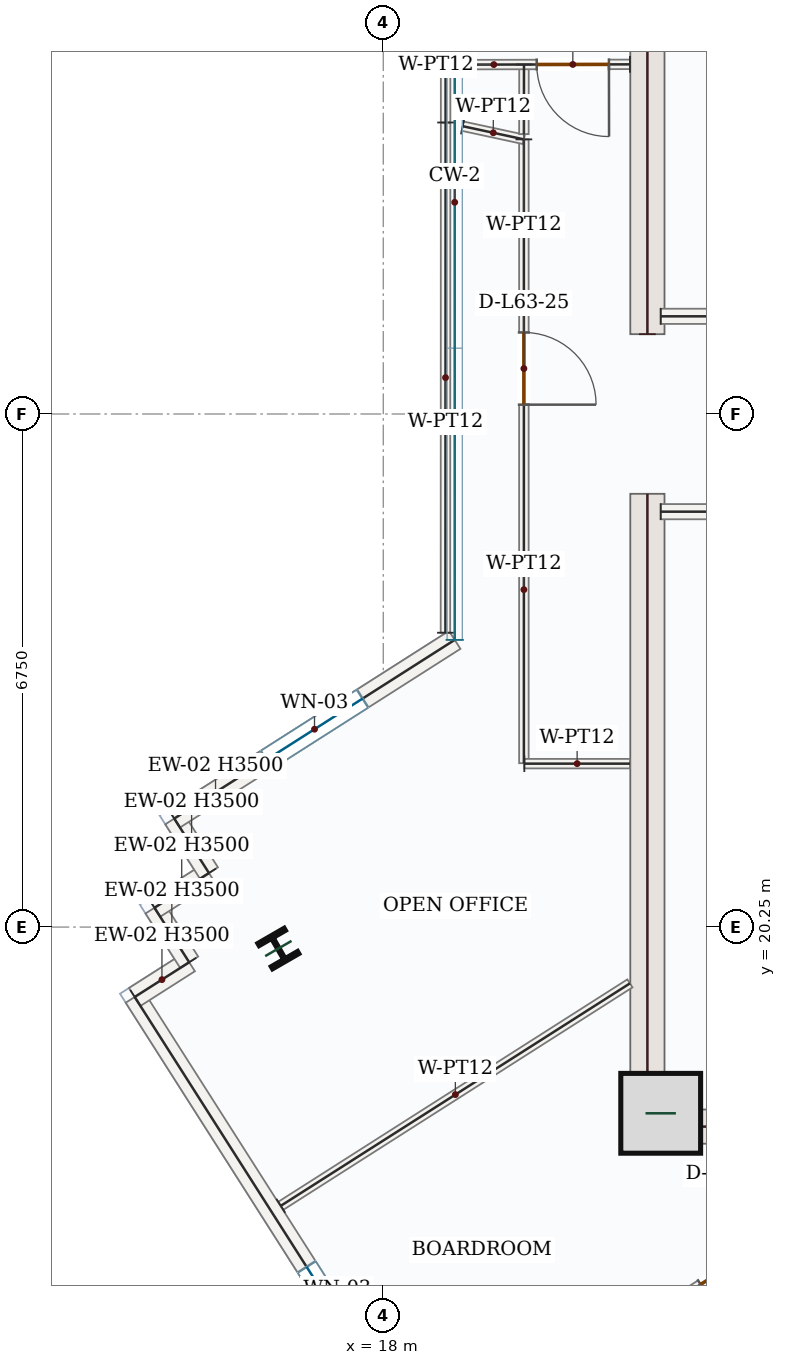
"""IFC4 building model, lengths in metres.
Left out: names, types, materials, properties, quantities, classifications, styles, units other than length and angle.
Written with IfcOpenShell. Run it as: python <this file> out.ifc"""

import sys

from ifc_helpers import new_model, si_unit, direction, frame, frame_2d, origin, origin_2d, place, context, subcontext, project, spatial, rectangle, i_section, extrude, source, transform, mapped, element, fill, save


model = new_model("IFC4")
c1 = context("Model", 3, precision=1e-05, world=origin(), true_north=direction((0.0, 1.0)))
c2 = subcontext(c1, "Body", "Model", "MODEL_VIEW")
j1 = project(units=[si_unit("LENGTHUNIT", "METRE"), si_unit("PLANEANGLEUNIT", "RADIAN")], contexts=[c1])
p1 = place(None, origin())
s1 = spatial("IfcSite", under=j1, at=p1, CompositionType="ELEMENT")
p2 = place(p1, origin())
s2 = spatial("IfcBuilding", under=s1, at=p2, CompositionType="ELEMENT")
p3 = place(p2, frame((0.0, 0.0, 265.35)))
s3 = spatial("IfcBuildingStorey", under=s2, at=p3, CompositionType="ELEMENT", Elevation=265.35)
m1 = source(origin(), c2, "Body", "SweptSolid", [
    extrude(rectangle(XDim=8.55, YDim=0.45, at=frame_2d((4.275, 0.0))), origin(), (0.0, 0.0, 1.0), 3.5),
])
for number, where, z_axis, x_axis in (
    (1, (21.475, 17.4, 0.0), (0.0, 0.0, 1.0), (0.0, 1.0, 0.0)),
    (2, (21.475, 28.05, 0.0), (0.0, 0.0, 1.0), (0.0, 1.0, 0.0)),
):
    element("IfcWall", number, at=place(p3, frame(where, z_axis=z_axis, x_axis=x_axis)), inside=s3, PredefinedType="SHEAR", context=c2, shape_type="MappedRepresentation", body=[
        mapped(m1, transform((0.0, 0.0, 0.0), x_axis=(1.0, 0.0, 0.0), y_axis=(0.0, 1.0, 0.0), z_axis=(0.0, 0.0, 1.0), scale=1.0)),
    ])
m2 = source(origin(), c2, "Body", "SweptSolid", [
    extrude(rectangle(XDim=7.1, YDim=0.45, at=frame_2d((3.55, 0.0))), origin(), (0.0, 0.0, 1.0), 3.5),
])
p4 = place(p3, frame((21.7, 17.625, 0.0), z_axis=(0.0, 0.0, 1.0), x_axis=(1.0, 0.0, 0.0)))
e3 = element("IfcWall", 3, at=p4, inside=s3, PredefinedType="SHEAR", context=c2, shape_type="MappedRepresentation", body=[
    mapped(m2, transform((0.0, 0.0, 0.0), x_axis=(1.0, 0.0, 0.0), y_axis=(0.0, 1.0, 0.0), z_axis=(0.0, 0.0, 1.0), scale=1.0)),
])
m3 = source(origin(), c2, "Body", "SweptSolid", [
    extrude(rectangle(XDim=1.05, YDim=1.05, at=origin_2d()), origin(), (0.0, 0.0, 1.0), 3.75),
])
p5 = place(p3, frame((21.65, 17.8, 0.0), z_axis=(0.0, 0.0, 1.0), x_axis=(1.0, 0.0, 0.0)))
e4 = element("IfcColumn", 4, at=p5, inside=s3, PredefinedType="COLUMN", context=c2, shape_type="MappedRepresentation", body=[
    mapped(m3, transform((0.0, 0.0, 0.0), x_axis=(1.0, 0.0, 0.0), y_axis=(0.0, 1.0, 0.0), z_axis=(0.0, 0.0, 1.0), scale=1.0)),
])
m4 = source(origin(), c2, "Body", "SweptSolid", [
    extrude(i_section(OverallWidth=0.399, OverallDepth=0.386, WebThickness=0.021, FlangeThickness=0.033, FilletRadius=0.018, at=origin_2d()), origin(), (0.0, 0.0, 1.0), 3.75),
])
p6 = place(p3, frame((16.62, 19.968, 0.0), z_axis=(0.0, 0.0, 1.0), x_axis=(0.866025403784, 0.5, 0.0)))
e5 = element("IfcColumn", 5, at=p6, inside=s3, PredefinedType="COLUMN", context=c2, shape_type="MappedRepresentation", body=[
    mapped(m4, transform((0.0, 0.0, 0.0), x_axis=(1.0, 0.0, 0.0), y_axis=(0.0, 1.0, 0.0), z_axis=(0.0, 0.0, 1.0), scale=1.0)),
])
p7 = place(p3, frame((20.06, 10.964, 0.0), z_axis=(0.0, 0.0, 1.0), x_axis=(-0.537314949054, 0.843381672508, 0.0)))
e6 = element("IfcWall", 6, at=p7, inside=s3, PredefinedType="SOLIDWALL", context=c2, shape_type="SweptSolid", body=[
    extrude(rectangle(XDim=9.92, YDim=0.28, at=frame_2d((4.96, 0.0))), origin(), (0.0, 0.0, 1.0), 3.5),
])
p8 = place(p7, frame((4.21, 0.0, 0.85)))
e7 = element("IfcOpeningElement", 7, at=p8, cuts=e6, PredefinedType="OPENING", context=c2, shape_type="SweptSolid", body=[
    extrude(rectangle(XDim=1.5, YDim=1.5, at=frame_2d((0.75, 0.75))), frame((0.0, 0.15, 0.0), z_axis=(0.0, -1.0, 0.0), x_axis=(1.0, 0.0, 0.0)), (0.0, 0.0, 1.0), 0.3),
])
m5 = source(origin(), c2, "Body", "SweptSolid", [
    extrude(rectangle(XDim=0.85, YDim=0.28, at=frame_2d((0.425, 0.0))), origin(), (0.0, 0.0, 1.0), 3.5),
])
p9 = place(p3, frame((14.73, 19.33, 0.0), z_axis=(0.0, 0.0, 1.0), x_axis=(0.843401251716, 0.537284215853, 0.0)))
e8 = element("IfcWall", 8, at=p9, inside=s3, PredefinedType="SOLIDWALL", context=c2, shape_type="MappedRepresentation", body=[
    mapped(m5, transform((0.0, 0.0, 0.0), x_axis=(1.0, 0.0, 0.0), y_axis=(0.0, 1.0, 0.0), z_axis=(0.0, 0.0, 1.0), scale=1.0)),
])
m6 = source(origin(), c2, "Body", "SweptSolid", [
    extrude(rectangle(XDim=0.85, YDim=0.28, at=frame_2d((0.425, 0.0))), origin(), (0.0, 0.0, 1.0), 3.5),
])
for number, where, z_axis, x_axis in (
    (9, (15.447, 19.787, 0.0), (0.0, 0.0, 1.0), (-0.537, 0.843, 0.0)),
    (10, (14.99, 20.504, 0.0), (0.0, 0.0, 1.0), (0.843, 0.537, 0.0)),
    (11, (15.707, 20.961, 0.0), (0.0, 0.0, 1.0), (-0.537, 0.843, 0.0)),
):
    element("IfcWall", number, at=place(p3, frame(where, z_axis=z_axis, x_axis=x_axis)), inside=s3, PredefinedType="SOLIDWALL", context=c2, shape_type="MappedRepresentation", body=[
        mapped(m6, transform((0.0, 0.0, 0.0), x_axis=(1.0, 0.0, 0.0), y_axis=(0.0, 1.0, 0.0), z_axis=(0.0, 0.0, 1.0), scale=1.0)),
    ])
p10 = place(p3, frame((15.25, 21.677, 0.0), z_axis=(0.0, 0.0, 1.0), x_axis=(0.843383352012, 0.537312312857, 0.0)))
e12 = element("IfcWall", 12, at=p10, inside=s3, PredefinedType="SOLIDWALL", context=c2, shape_type="SweptSolid", body=[
    extrude(rectangle(XDim=4.375, YDim=0.28, at=frame_2d((2.188, 0.0))), origin(), (0.0, 0.0, 1.0), 3.5),
])
p11 = place(p10, frame((1.438, 0.0, 0.85)))
e13 = element("IfcOpeningElement", 13, at=p11, cuts=e12, PredefinedType="OPENING", context=c2, shape_type="SweptSolid", body=[
    extrude(rectangle(XDim=1.5, YDim=1.5, at=frame_2d((0.75, 0.75))), frame((0.0, 0.15, 0.0), z_axis=(0.0, -1.0, 0.0), x_axis=(1.0, 0.0, 0.0)), (0.0, 0.0, 1.0), 0.3),
])
m7 = source(origin(), c2, "Body", "SweptSolid", [
    extrude(rectangle(XDim=4.25, YDim=0.2, at=frame_2d((2.125, 0.0))), origin(), (0.0, 0.0, 1.0), 3.5),
])
for number, where, z_axis, x_axis in (
    (14, (21.65, 25.715, 0.0), (0.0, 0.0, 1.0), (1.0, 0.0, 0.0)),
    (15, (21.65, 28.285, 0.0), (0.0, 0.0, 1.0), (1.0, 0.0, 0.0)),
):
    element("IfcWall", number, at=place(p3, frame(where, z_axis=z_axis, x_axis=x_axis)), inside=s3, PredefinedType="SOLIDWALL", context=c2, shape_type="MappedRepresentation", body=[
        mapped(m7, transform((0.0, 0.0, 0.0), x_axis=(1.0, 0.0, 0.0), y_axis=(0.0, 1.0, 0.0), z_axis=(0.0, 0.0, 1.0), scale=1.0)),
    ])
p12 = place(p3, frame((25.073, 17.395, 0.0), z_axis=(0.0, 0.0, 1.0), x_axis=(-0.843398332862, -0.537288797693, 0.0)))
e16 = element("IfcWall", 16, at=p12, inside=s3, PredefinedType="PARTITIONING", context=c2, shape_type="SweptSolid", body=[
    extrude(rectangle(XDim=5.924, YDim=0.125, at=frame_2d((2.962, 0.0))), origin(), (0.0, 0.0, 1.0), 3.5),
])
p13 = place(p12, frame((2.487, 0.0, 0.0)))
e17 = element("IfcOpeningElement", 17, at=p13, cuts=e16, PredefinedType="OPENING", context=c2, shape_type="SweptSolid", body=[
    extrude(rectangle(XDim=0.95, YDim=2.15, at=frame_2d((0.475, 1.075))), frame((0.0, 0.073, 0.0), z_axis=(0.0, -1.0, 0.0), x_axis=(1.0, 0.0, 0.0)), (0.0, 0.0, 1.0), 0.145),
])
m8 = source(origin(), c2, "Body", "SweptSolid", [
    extrude(rectangle(XDim=5.446, YDim=0.125, at=frame_2d((2.723, 0.0))), origin(), (0.0, 0.0, 1.0), 3.5),
])
p14 = place(p3, frame((16.652, 16.583, 0.0), z_axis=(0.0, 0.0, 1.0), x_axis=(0.843395566027, 0.537293140851, 0.0)))
e18 = element("IfcWall", 18, at=p14, inside=s3, PredefinedType="PARTITIONING", context=c2, shape_type="MappedRepresentation", body=[
    mapped(m8, transform((0.0, 0.0, 0.0), x_axis=(1.0, 0.0, 0.0), y_axis=(0.0, 1.0, 0.0), z_axis=(0.0, 0.0, 1.0), scale=1.0)),
])
p15 = place(p3, frame((19.85, 30.613, 0.0), z_axis=(0.0, 0.0, 1.0), x_axis=(0.0, -1.0, 0.0)))
e19 = element("IfcWall", 19, at=p15, inside=s3, PredefinedType="PARTITIONING", context=c2, shape_type="SweptSolid", body=[
    extrude(rectangle(XDim=8.207, YDim=0.125, at=frame_2d((4.104, 0.0))), origin(), (0.0, 0.0, 1.0), 3.5),
])
p16 = place(p15, frame((2.54, 0.0, 0.0)))
e20 = element("IfcOpeningElement", 20, at=p16, cuts=e19, PredefinedType="OPENING", context=c2, shape_type="SweptSolid", body=[
    extrude(rectangle(XDim=0.95, YDim=2.15, at=frame_2d((0.475, 1.075))), frame((0.0, 0.073, 0.0), z_axis=(0.0, -1.0, 0.0), x_axis=(1.0, 0.0, 0.0)), (0.0, 0.0, 1.0), 0.145),
])
m9 = source(origin(), c2, "Body", "SweptSolid", [
    extrude(rectangle(XDim=1.389, YDim=0.125, at=frame_2d((0.695, 0.0))), origin(), (0.0, 0.0, 1.0), 3.5),
])
p17 = place(p3, frame((19.856, 22.4, 0.0), z_axis=(0.0, 0.0, 1.0), x_axis=(1.0, 0.0, 0.0)))
e21 = element("IfcWall", 21, at=p17, inside=s3, PredefinedType="PARTITIONING", context=c2, shape_type="MappedRepresentation", body=[
    mapped(m9, transform((0.0, 0.0, 0.0), x_axis=(1.0, 0.0, 0.0), y_axis=(0.0, 1.0, 0.0), z_axis=(0.0, 0.0, 1.0), scale=1.0)),
])
m10 = source(origin(), c2, "Body", "SweptSolid", [
    extrude(rectangle(XDim=6.713, YDim=0.125, at=frame_2d((3.356, 0.0))), origin(), (0.0, 0.0, 1.0), 3.5),
])
p18 = place(p3, frame((18.818, 24.122, 0.0), z_axis=(0.0, 0.0, 1.0), x_axis=(0.000327332225, 0.999999946427, 0.0)))
e22 = element("IfcWall", 22, at=p18, inside=s3, PredefinedType="PARTITIONING", context=c2, shape_type="MappedRepresentation", body=[
    mapped(m10, transform((0.0, 0.0, 0.0), x_axis=(1.0, 0.0, 0.0), y_axis=(0.0, 1.0, 0.0), z_axis=(0.0, 0.0, 1.0), scale=1.0)),
])
m11 = source(origin(), c2, "Body", "SweptSolid", [
    extrude(rectangle(XDim=0.824, YDim=0.125, at=frame_2d((0.412, 0.0))), origin(), (0.0, 0.0, 1.0), 3.5),
])
p19 = place(p3, frame((19.045, 30.786, 0.0), z_axis=(0.0, 0.0, 1.0), x_axis=(0.977541402347, -0.210743461816, 0.0)))
e23 = element("IfcWall", 23, at=p19, inside=s3, PredefinedType="PARTITIONING", context=c2, shape_type="MappedRepresentation", body=[
    mapped(m11, transform((0.0, 0.0, 0.0), x_axis=(1.0, 0.0, 0.0), y_axis=(0.0, 1.0, 0.0), z_axis=(0.0, 0.0, 1.0), scale=1.0)),
])
m12 = source(origin(), c2, "Body", "SweptSolid", [
    extrude(rectangle(XDim=0.916, YDim=0.125, at=frame_2d((0.458, 0.0))), origin(), (0.0, 0.0, 1.0), 3.5),
])
p20 = place(p3, frame((19.851, 31.598, 0.0), z_axis=(0.0, 0.0, 1.0), x_axis=(-0.001332976688, -0.999999111586, 0.0)))
e24 = element("IfcWall", 24, at=p20, inside=s3, PredefinedType="PARTITIONING", context=c2, shape_type="MappedRepresentation", body=[
    mapped(m12, transform((0.0, 0.0, 0.0), x_axis=(1.0, 0.0, 0.0), y_axis=(0.0, 1.0, 0.0), z_axis=(0.0, 0.0, 1.0), scale=1.0)),
])
m13 = source(origin(), c2, "Body", "SweptSolid", [
    extrude(rectangle(XDim=4.757, YDim=0.125, at=frame_2d((2.378, 0.0))), origin(), (0.0, 0.0, 1.0), 3.5),
])
p21 = place(p3, frame((18.82, 30.835, 0.0), z_axis=(0.0, 0.0, 1.0), x_axis=(0.0, 1.0, 0.0)))
e25 = element("IfcWall", 25, at=p21, inside=s3, PredefinedType="PARTITIONING", context=c2, shape_type="MappedRepresentation", body=[
    mapped(m13, transform((0.0, 0.0, 0.0), x_axis=(1.0, 0.0, 0.0), y_axis=(0.0, 1.0, 0.0), z_axis=(0.0, 0.0, 1.0), scale=1.0)),
])
p22 = place(p3, frame((21.245, 31.6, 0.0), z_axis=(0.0, 0.0, 1.0), x_axis=(-0.999998798684, -0.001550042425, 0.0)))
e26 = element("IfcWall", 26, at=p22, inside=s3, PredefinedType="PARTITIONING", context=c2, shape_type="SweptSolid", body=[
    extrude(rectangle(XDim=2.205, YDim=0.125, at=frame_2d((1.103, 0.0))), origin(), (0.0, 0.0, 1.0), 3.5),
])
p23 = place(p22, frame((0.276, 0.0, 0.0)))
e27 = element("IfcOpeningElement", 27, at=p23, cuts=e26, PredefinedType="OPENING", context=c2, shape_type="SweptSolid", body=[
    extrude(rectangle(XDim=0.95, YDim=2.15, at=frame_2d((0.475, 1.075))), frame((0.0, 0.073, 0.0), z_axis=(0.0, -1.0, 0.0), x_axis=(1.0, 0.0, 0.0)), (0.0, 0.0, 1.0), 0.145),
])
m14 = source(origin(), c2, "Body", "SweptSolid", [
    extrude(rectangle(XDim=1.5, YDim=1.5, at=frame_2d((0.75, 0.75))), frame((0.0, 0.03, 0.0), z_axis=(0.0, -1.0, 0.0), x_axis=(1.0, 0.0, 0.0)), (0.0, 0.0, 1.0), 0.06),
])
p24 = place(p8, origin())
e28 = element("IfcWindow", 28, at=p24, inside=s3, PartitioningType="SINGLE_PANEL", PredefinedType="WINDOW", context=c2, shape_type="MappedRepresentation", body=[
    mapped(m14, transform((0.0, 0.0, 0.0), x_axis=(1.0, 0.0, 0.0), y_axis=(0.0, 1.0, 0.0), z_axis=(0.0, 0.0, 1.0), scale=1.0)),
])
fill(e7, e28)
p25 = place(p11, origin())
e29 = element("IfcWindow", 29, at=p25, inside=s3, PartitioningType="SINGLE_PANEL", PredefinedType="WINDOW", context=c2, shape_type="MappedRepresentation", body=[
    mapped(m14, transform((0.0, 0.0, 0.0), x_axis=(1.0, 0.0, 0.0), y_axis=(0.0, 1.0, 0.0), z_axis=(0.0, 0.0, 1.0), scale=1.0)),
])
fill(e13, e29)
m15 = source(origin(), c2, "Body", "SweptSolid", [
    extrude(rectangle(XDim=0.95, YDim=2.15, at=frame_2d((0.475, 1.075))), frame((0.0, 0.025, 0.0), z_axis=(0.0, -1.0, 0.0), x_axis=(1.0, 0.0, 0.0)), (0.0, 0.0, 1.0), 0.05),
])
p26 = place(p23, origin())
e30 = element("IfcDoor", 30, at=p26, inside=s3, OperationType="SINGLE_SWING_LEFT", PredefinedType="DOOR", context=c2, shape_type="MappedRepresentation", body=[
    mapped(m15, transform((0.0, 0.0, 0.0), x_axis=(1.0, 0.0, 0.0), y_axis=(0.0, 1.0, 0.0), z_axis=(0.0, 0.0, 1.0), scale=1.0)),
])
fill(e27, e30)
p27 = place(p16, origin())
e31 = element("IfcDoor", 31, at=p27, inside=s3, OperationType="SINGLE_SWING_RIGHT", PredefinedType="DOOR", context=c2, shape_type="MappedRepresentation", body=[
    mapped(m15, transform((0.0, 0.0, 0.0), x_axis=(1.0, 0.0, 0.0), y_axis=(0.0, 1.0, 0.0), z_axis=(0.0, 0.0, 1.0), scale=1.0)),
])
fill(e20, e31)
p28 = place(p13, origin())
e32 = element("IfcDoor", 32, at=p28, inside=s3, OperationType="SINGLE_SWING_LEFT", PredefinedType="DOOR", context=c2, shape_type="MappedRepresentation", body=[
    mapped(m15, transform((0.0, 0.0, 0.0), x_axis=(1.0, 0.0, 0.0), y_axis=(0.0, 1.0, 0.0), z_axis=(0.0, 0.0, 1.0), scale=1.0)),
])
fill(e17, e32)
save(model, sys.argv[1])
